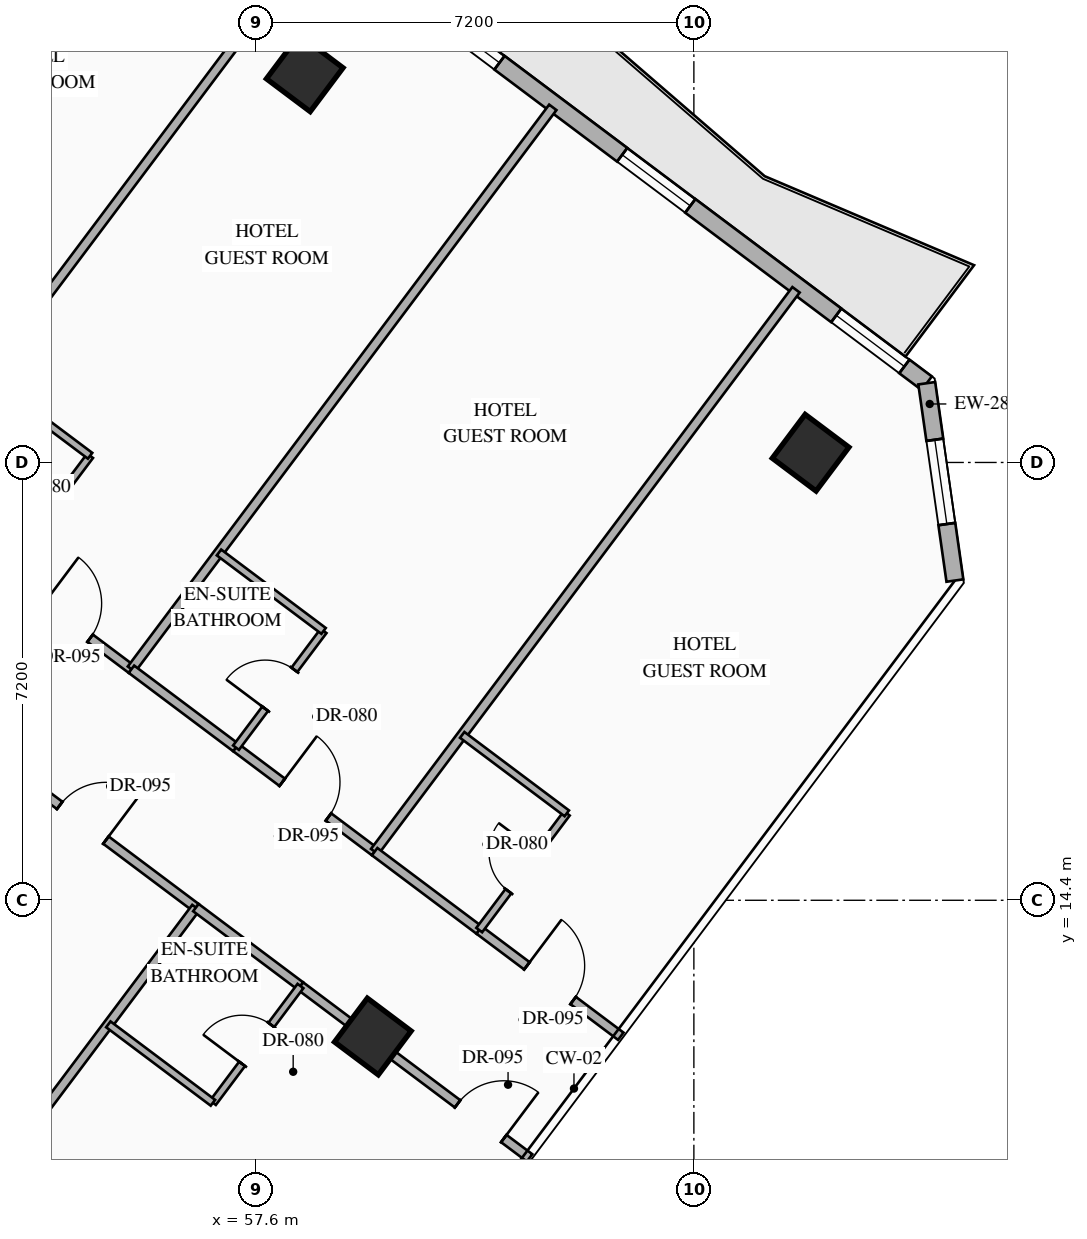
"""IFC4 building model, lengths in metres.
Left out: names, types, materials, properties, quantities, classifications, styles, units other than length and angle.
Written with IfcOpenShell. Run it as: python <this file> out.ifc"""

import sys

from ifc_helpers import new_model, si_unit, direction, frame, frame_2d, origin, origin_2d, place, context, subcontext, project, spatial, rectangle, hollow_rectangle, extrude, element, fill, save


model = new_model("IFC4")
c1 = context("Model", 3, precision=1e-05, world=origin(), true_north=direction((0.0, 1.0)))
c2 = subcontext(c1, "Body", "Model", "MODEL_VIEW")
j1 = project(units=[si_unit("LENGTHUNIT", "METRE"), si_unit("PLANEANGLEUNIT", "RADIAN")], contexts=[c1])
p1 = place(None, origin())
s1 = spatial("IfcSite", under=j1, at=p1, CompositionType="ELEMENT")
p2 = place(p1, origin())
s2 = spatial("IfcBuilding", under=s1, at=p2, CompositionType="ELEMENT")
p3 = place(p2, frame((0.0, 0.0, 88.0)))
s3 = spatial("IfcBuildingStorey", under=s2, at=p3, CompositionType="ELEMENT", Elevation=88.0)
for number, where, z_axis, x_axis in (
    (1, (58.4, 28.0, 0.0), (0.0, 0.0, 1.0), (0.8, -0.6, 0.0)),
    (2, (66.72, 21.76, 0.0), (0.0, 0.0, 1.0), (0.8, -0.6, 0.0)),
    (3, (59.52, 12.16, 0.0), (0.0, 0.0, 1.0), (0.8, -0.6, 0.0)),
):
    element("IfcColumn", number, at=place(p3, frame(where, z_axis=z_axis, x_axis=x_axis)), inside=s3, PredefinedType="COLUMN", context=c2, shape_type="SweptSolid", body=[
        extrude(hollow_rectangle(XDim=0.9, YDim=0.9, WallThickness=0.036, at=origin_2d()), origin(), (0.0, 0.0, 1.0), 3.35),
    ])
p4 = place(p3, frame((44.86, 40.73, 0.0), z_axis=(0.0, 0.0, 1.0), x_axis=(0.800006902154, -0.599990797017, 0.0)))
e4 = element("IfcWall", 4, at=p4, inside=s3, PredefinedType="STANDARD", context=c2, shape_type="SweptSolid", body=[
    extrude(rectangle(XDim=29.712, YDim=0.28, at=frame_2d((14.856, 0.0))), origin(), (0.0, 0.0, 1.0), 3.05),
])
p5 = place(p4, frame((14.249, 0.0, 0.0)))
e5 = element("IfcOpeningElement", 5, at=p5, cuts=e4, PredefinedType="OPENING", context=c2, shape_type="SweptSolid", body=[
    extrude(rectangle(XDim=1.1, YDim=2.2, at=frame_2d((0.55, 1.1))), frame((0.0, 0.15, 0.0), z_axis=(0.0, -1.0, 0.0), x_axis=(1.0, 0.0, 0.0)), (0.0, 0.0, 1.0), 0.3),
])
p6 = place(p4, frame((1.612, 0.0, 0.85)))
e6 = element("IfcOpeningElement", 6, at=p6, cuts=e4, PredefinedType="OPENING", context=c2, shape_type="SweptSolid", body=[
    extrude(rectangle(XDim=1.4, YDim=1.8, at=frame_2d((0.7, 0.9))), frame((0.0, 0.15, 0.0), z_axis=(0.0, -1.0, 0.0), x_axis=(1.0, 0.0, 0.0)), (0.0, 0.0, 1.0), 0.3),
])
p7 = place(p4, frame((5.667, 0.0, 0.85)))
e7 = element("IfcOpeningElement", 7, at=p7, cuts=e4, PredefinedType="OPENING", context=c2, shape_type="SweptSolid", body=[
    extrude(rectangle(XDim=1.4, YDim=1.8, at=frame_2d((0.7, 0.9))), frame((0.0, 0.15, 0.0), z_axis=(0.0, -1.0, 0.0), x_axis=(1.0, 0.0, 0.0)), (0.0, 0.0, 1.0), 0.3),
])
p8 = place(p4, frame((9.912, 0.0, 0.85)))
e8 = element("IfcOpeningElement", 8, at=p8, cuts=e4, PredefinedType="OPENING", context=c2, shape_type="SweptSolid", body=[
    extrude(rectangle(XDim=1.4, YDim=1.8, at=frame_2d((0.7, 0.9))), frame((0.0, 0.15, 0.0), z_axis=(0.0, -1.0, 0.0), x_axis=(1.0, 0.0, 0.0)), (0.0, 0.0, 1.0), 0.3),
])
p9 = place(p4, frame((19.528, 0.0, 0.85)))
e9 = element("IfcOpeningElement", 9, at=p9, cuts=e4, PredefinedType="OPENING", context=c2, shape_type="SweptSolid", body=[
    extrude(rectangle(XDim=1.4, YDim=1.8, at=frame_2d((0.7, 0.9))), frame((0.0, 0.15, 0.0), z_axis=(0.0, -1.0, 0.0), x_axis=(1.0, 0.0, 0.0)), (0.0, 0.0, 1.0), 0.3),
])
p10 = place(p4, frame((23.451, 0.0, 0.85)))
e10 = element("IfcOpeningElement", 10, at=p10, cuts=e4, PredefinedType="OPENING", context=c2, shape_type="SweptSolid", body=[
    extrude(rectangle(XDim=1.4, YDim=1.8, at=frame_2d((0.7, 0.9))), frame((0.0, 0.15, 0.0), z_axis=(0.0, -1.0, 0.0), x_axis=(1.0, 0.0, 0.0)), (0.0, 0.0, 1.0), 0.3),
])
p11 = place(p4, frame((27.852, 0.0, 0.85)))
e11 = element("IfcOpeningElement", 11, at=p11, cuts=e4, PredefinedType="OPENING", context=c2, shape_type="SweptSolid", body=[
    extrude(rectangle(XDim=1.4, YDim=1.8, at=frame_2d((0.7, 0.9))), frame((0.0, 0.15, 0.0), z_axis=(0.0, -1.0, 0.0), x_axis=(1.0, 0.0, 0.0)), (0.0, 0.0, 1.0), 0.3),
])
p12 = place(p3, frame((68.63, 22.903, 0.0), z_axis=(0.0, 0.0, 1.0), x_axis=(0.141285803956, -0.989968848803, 0.0)))
e12 = element("IfcWall", 12, at=p12, inside=s3, PredefinedType="STANDARD", context=c2, shape_type="SweptSolid", body=[
    extrude(rectangle(XDim=3.278, YDim=0.28, at=frame_2d((1.639, 0.0))), origin(), (0.0, 0.0, 1.0), 3.05),
])
p13 = place(p12, frame((0.939, 0.0, 0.85)))
e13 = element("IfcOpeningElement", 13, at=p13, cuts=e12, PredefinedType="OPENING", context=c2, shape_type="SweptSolid", body=[
    extrude(rectangle(XDim=1.4, YDim=1.8, at=frame_2d((0.7, 0.9))), frame((0.0, 0.15, 0.0), z_axis=(0.0, -1.0, 0.0), x_axis=(1.0, 0.0, 0.0)), (0.0, 0.0, 1.0), 0.3),
])
for number, where, z_axis, x_axis in (
    (14, (47.87, 23.96, 0.0), (0.0, 0.0, 1.0), (0.6, 0.8, 0.0)),
    (15, (51.71, 21.08, 0.0), (0.0, 0.0, 1.0), (0.6, 0.8, 0.0)),
):
    element("IfcWall", number, at=place(p3, frame(where, z_axis=z_axis, x_axis=x_axis)), inside=s3, PredefinedType="PARTITIONING", context=c2, shape_type="SweptSolid", body=[
        extrude(rectangle(XDim=11.55, YDim=0.15, at=frame_2d((5.775, 0.0))), origin(), (0.0, 0.0, 1.0), 3.05),
    ])
p14 = place(p3, frame((53.43, 19.79, 0.0), z_axis=(0.0, 0.0, 1.0), x_axis=(0.8, -0.6, 0.0)))
e16 = element("IfcWall", 16, at=p14, inside=s3, PredefinedType="PARTITIONING", context=c2, shape_type="SweptSolid", body=[
    extrude(rectangle(XDim=2.65, YDim=0.15, at=frame_2d((1.325, 0.0))), origin(), (0.0, 0.0, 1.0), 2.695),
])
p15 = place(p14, frame((0.85, 0.0, 0.0)))
e17 = element("IfcOpeningElement", 17, at=p15, cuts=e16, PredefinedType="OPENING", context=c2, shape_type="SweptSolid", body=[
    extrude(rectangle(XDim=0.95, YDim=2.15, at=frame_2d((0.475, 1.075))), frame((0.0, 0.085, 0.0), z_axis=(0.0, -1.0, 0.0), x_axis=(1.0, 0.0, 0.0)), (0.0, 0.0, 1.0), 0.17),
])
p16 = place(p3, frame((53.43, 19.79, 0.0), z_axis=(0.0, 0.0, 1.0), x_axis=(0.600065100855, 0.79995117022, 0.0)))
e18 = element("IfcWall", 18, at=p16, inside=s3, PredefinedType="PARTITIONING", context=c2, shape_type="SweptSolid", body=[
    extrude(rectangle(XDim=2.4, YDim=0.12, at=frame_2d((1.2, 0.0))), origin(), (0.0, 0.0, 1.0), 3.05),
])
p17 = place(p16, frame((0.8, 0.0, 0.0)))
e19 = element("IfcOpeningElement", 19, at=p17, cuts=e18, PredefinedType="OPENING", context=c2, shape_type="SweptSolid", body=[
    extrude(rectangle(XDim=0.8, YDim=2.06, at=frame_2d((0.4, 1.03))), frame((0.0, 0.07, 0.0), z_axis=(0.0, -1.0, 0.0), x_axis=(1.0, 0.0, 0.0)), (0.0, 0.0, 1.0), 0.14),
])
p18 = place(p3, frame((53.15, 23.0, 0.0), z_axis=(0.0, 0.0, 1.0), x_axis=(0.800027249606, -0.599963665473, 0.0)))
e20 = element("IfcWall", 20, at=p18, inside=s3, PredefinedType="PARTITIONING", context=c2, shape_type="SweptSolid", body=[
    extrude(rectangle(XDim=2.15, YDim=0.12, at=frame_2d((1.075, 0.0))), origin(), (0.0, 0.0, 1.0), 3.05),
])
p19 = place(p3, frame((55.55, 18.2, 0.0), z_axis=(0.0, 0.0, 1.0), x_axis=(0.599996617946, 0.80000253653, 0.0)))
e21 = element("IfcWall", 21, at=p19, inside=s3, PredefinedType="PARTITIONING", context=c2, shape_type="SweptSolid", body=[
    extrude(rectangle(XDim=11.55, YDim=0.15, at=frame_2d((5.775, 0.0))), origin(), (0.0, 0.0, 1.0), 3.05),
])
p20 = place(p3, frame((55.55, 18.2, 0.0), z_axis=(0.0, 0.0, 1.0), x_axis=(0.79998637334, -0.60001816845, 0.0)))
e22 = element("IfcWall", 22, at=p20, inside=s3, PredefinedType="PARTITIONING", context=c2, shape_type="SweptSolid", body=[
    extrude(rectangle(XDim=2.15, YDim=0.15, at=frame_2d((1.075, 0.0))), origin(), (0.0, 0.0, 1.0), 2.695),
])
p21 = place(p3, frame((57.27, 16.91, 0.0), z_axis=(0.0, 0.0, 1.0), x_axis=(0.800010279488, -0.599986293772, 0.0)))
e23 = element("IfcWall", 23, at=p21, inside=s3, PredefinedType="PARTITIONING", context=c2, shape_type="SweptSolid", body=[
    extrude(rectangle(XDim=2.85, YDim=0.15, at=frame_2d((1.425, 0.0))), origin(), (0.0, 0.0, 1.0), 2.695),
])
p22 = place(p21, frame((0.95, 0.0, 0.0)))
e24 = element("IfcOpeningElement", 24, at=p22, cuts=e23, PredefinedType="OPENING", context=c2, shape_type="SweptSolid", body=[
    extrude(rectangle(XDim=0.95, YDim=2.15, at=frame_2d((0.475, 1.075))), frame((0.0, 0.085, 0.0), z_axis=(0.0, -1.0, 0.0), x_axis=(1.0, 0.0, 0.0)), (0.0, 0.0, 1.0), 0.17),
])
p23 = place(p3, frame((57.27, 16.91, 0.0), z_axis=(0.0, 0.0, 1.0), x_axis=(0.599951172744, 0.800036618114, 0.0)))
e25 = element("IfcWall", 25, at=p23, inside=s3, PredefinedType="PARTITIONING", context=c2, shape_type="SweptSolid", body=[
    extrude(rectangle(XDim=2.4, YDim=0.12, at=frame_2d((1.2, 0.0))), origin(), (0.0, 0.0, 1.0), 3.05),
])
p24 = place(p23, frame((0.8, 0.0, 0.0)))
e26 = element("IfcOpeningElement", 26, at=p24, cuts=e25, PredefinedType="OPENING", context=c2, shape_type="SweptSolid", body=[
    extrude(rectangle(XDim=0.8, YDim=2.06, at=frame_2d((0.4, 1.03))), frame((0.0, 0.07, 0.0), z_axis=(0.0, -1.0, 0.0), x_axis=(1.0, 0.0, 0.0)), (0.0, 0.0, 1.0), 0.14),
])
p25 = place(p3, frame((56.99, 20.12, 0.0), z_axis=(0.0, 0.0, 1.0), x_axis=(0.79998637334, -0.60001816845, 0.0)))
e27 = element("IfcWall", 27, at=p25, inside=s3, PredefinedType="PARTITIONING", context=c2, shape_type="SweptSolid", body=[
    extrude(rectangle(XDim=2.15, YDim=0.12, at=frame_2d((1.075, 0.0))), origin(), (0.0, 0.0, 1.0), 3.05),
])
p26 = place(p3, frame((59.55, 15.2, 0.0), z_axis=(0.0, 0.0, 1.0), x_axis=(0.599996617946, 0.80000253653, 0.0)))
e28 = element("IfcWall", 28, at=p26, inside=s3, PredefinedType="PARTITIONING", context=c2, shape_type="SweptSolid", body=[
    extrude(rectangle(XDim=11.55, YDim=0.15, at=frame_2d((5.775, 0.0))), origin(), (0.0, 0.0, 1.0), 3.05),
])
p27 = place(p3, frame((59.55, 15.2, 0.0), z_axis=(0.0, 0.0, 1.0), x_axis=(0.79998637334, -0.60001816845, 0.0)))
e29 = element("IfcWall", 29, at=p27, inside=s3, PredefinedType="PARTITIONING", context=c2, shape_type="SweptSolid", body=[
    extrude(rectangle(XDim=2.15, YDim=0.15, at=frame_2d((1.075, 0.0))), origin(), (0.0, 0.0, 1.0), 2.695),
])
p28 = place(p3, frame((61.27, 13.91, 0.0), z_axis=(0.0, 0.0, 1.0), x_axis=(0.800010068184, -0.59998657552, 0.0)))
e30 = element("IfcWall", 30, at=p28, inside=s3, PredefinedType="PARTITIONING", context=c2, shape_type="SweptSolid", body=[
    extrude(rectangle(XDim=2.91, YDim=0.15, at=frame_2d((1.455, 0.0))), origin(), (0.0, 0.0, 1.0), 3.05),
])
p29 = place(p28, frame((0.98, 0.0, 0.0)))
e31 = element("IfcOpeningElement", 31, at=p29, cuts=e30, PredefinedType="OPENING", context=c2, shape_type="SweptSolid", body=[
    extrude(rectangle(XDim=0.95, YDim=2.15, at=frame_2d((0.475, 1.075))), frame((0.0, 0.085, 0.0), z_axis=(0.0, -1.0, 0.0), x_axis=(1.0, 0.0, 0.0)), (0.0, 0.0, 1.0), 0.17),
])
p30 = place(p3, frame((61.27, 13.91, 0.0), z_axis=(0.0, 0.0, 1.0), x_axis=(0.599951172744, 0.800036618114, 0.0)))
e32 = element("IfcWall", 32, at=p30, inside=s3, PredefinedType="PARTITIONING", context=c2, shape_type="SweptSolid", body=[
    extrude(rectangle(XDim=2.4, YDim=0.12, at=frame_2d((1.2, 0.0))), origin(), (0.0, 0.0, 1.0), 3.05),
])
p31 = place(p30, frame((0.8, 0.0, 0.0)))
e33 = element("IfcOpeningElement", 33, at=p31, cuts=e32, PredefinedType="OPENING", context=c2, shape_type="SweptSolid", body=[
    extrude(rectangle(XDim=0.8, YDim=2.06, at=frame_2d((0.4, 1.03))), frame((0.0, 0.07, 0.0), z_axis=(0.0, -1.0, 0.0), x_axis=(1.0, 0.0, 0.0)), (0.0, 0.0, 1.0), 0.14),
])
p32 = place(p3, frame((60.99, 17.12, 0.0), z_axis=(0.0, 0.0, 1.0), x_axis=(0.79998637334, -0.60001816845, 0.0)))
e34 = element("IfcWall", 34, at=p32, inside=s3, PredefinedType="PARTITIONING", context=c2, shape_type="SweptSolid", body=[
    extrude(rectangle(XDim=2.15, YDim=0.12, at=frame_2d((1.075, 0.0))), origin(), (0.0, 0.0, 1.0), 3.05),
])
p33 = place(p3, frame((52.89, 17.07, 0.0), z_axis=(0.0, 0.0, 1.0), x_axis=(0.800012600101, -0.599983199498, 0.0)))
e35 = element("IfcWall", 35, at=p33, inside=s3, PredefinedType="PARTITIONING", context=c2, shape_type="SweptSolid", body=[
    extrude(rectangle(XDim=4.65, YDim=0.15, at=frame_2d((2.325, 0.0))), origin(), (0.0, 0.0, 1.0), 2.345),
])
p34 = place(p33, frame((1.85, 0.0, 0.0)))
e36 = element("IfcOpeningElement", 36, at=p34, cuts=e35, PredefinedType="OPENING", context=c2, shape_type="SweptSolid", body=[
    extrude(rectangle(XDim=0.95, YDim=2.15, at=frame_2d((0.475, 1.075))), frame((0.0, 0.085, 0.0), z_axis=(0.0, -1.0, 0.0), x_axis=(1.0, 0.0, 0.0)), (0.0, 0.0, 1.0), 0.17),
])
p35 = place(p3, frame((49.8, 5.2, 0.0), z_axis=(0.0, 0.0, 1.0), x_axis=(0.6, 0.8, 0.0)))
e37 = element("IfcWall", 37, at=p35, inside=s3, PredefinedType="PARTITIONING", context=c2, shape_type="SweptSolid", body=[
    extrude(rectangle(XDim=11.35, YDim=0.15, at=frame_2d((5.675, 0.0))), origin(), (0.0, 0.0, 1.0), 3.05),
])
p36 = place(p3, frame((56.61, 14.28, 0.0), z_axis=(0.0, 0.0, 1.0), x_axis=(0.79998637334, -0.60001816845, 0.0)))
e38 = element("IfcWall", 38, at=p36, inside=s3, PredefinedType="PARTITIONING", context=c2, shape_type="SweptSolid", body=[
    extrude(rectangle(XDim=2.15, YDim=0.15, at=frame_2d((1.075, 0.0))), origin(), (0.0, 0.0, 1.0), 2.345),
])
p37 = place(p3, frame((58.33, 12.99, 0.0), z_axis=(0.0, 0.0, 1.0), x_axis=(0.799993779569, -0.600008293819, 0.0)))
e39 = element("IfcWall", 39, at=p37, inside=s3, PredefinedType="PARTITIONING", context=c2, shape_type="SweptSolid", body=[
    extrude(rectangle(XDim=4.71, YDim=0.15, at=frame_2d((2.355, 0.0))), origin(), (0.0, 0.0, 1.0), 2.345),
])
p38 = place(p37, frame((3.23, 0.0, 0.0)))
e40 = element("IfcOpeningElement", 40, at=p38, cuts=e39, PredefinedType="OPENING", context=c2, shape_type="SweptSolid", body=[
    extrude(rectangle(XDim=0.95, YDim=2.15, at=frame_2d((0.475, 1.075))), frame((0.0, 0.085, 0.0), z_axis=(0.0, -1.0, 0.0), x_axis=(1.0, 0.0, 0.0)), (0.0, 0.0, 1.0), 0.17),
])
p39 = place(p3, frame((56.89, 11.07, 0.0), z_axis=(0.0, 0.0, 1.0), x_axis=(0.600065100855, 0.79995117022, 0.0)))
e41 = element("IfcWall", 41, at=p39, inside=s3, PredefinedType="PARTITIONING", context=c2, shape_type="SweptSolid", body=[
    extrude(rectangle(XDim=2.4, YDim=0.12, at=frame_2d((1.2, 0.0))), origin(), (0.0, 0.0, 1.0), 3.05),
])
p40 = place(p39, frame((0.8, 0.0, 0.0)))
e42 = element("IfcOpeningElement", 42, at=p40, cuts=e41, PredefinedType="OPENING", context=c2, shape_type="SweptSolid", body=[
    extrude(rectangle(XDim=0.8, YDim=2.06, at=frame_2d((0.4, 1.03))), frame((0.0, 0.07, 0.0), z_axis=(0.0, -1.0, 0.0), x_axis=(1.0, 0.0, 0.0)), (0.0, 0.0, 1.0), 0.14),
])
p41 = place(p3, frame((55.17, 12.36, 0.0), z_axis=(0.0, 0.0, 1.0), x_axis=(0.79998637334, -0.60001816845, 0.0)))
e43 = element("IfcWall", 43, at=p41, inside=s3, PredefinedType="PARTITIONING", context=c2, shape_type="SweptSolid", body=[
    extrude(rectangle(XDim=2.15, YDim=0.12, at=frame_2d((1.075, 0.0))), origin(), (0.0, 0.0, 1.0), 3.05),
])
p42 = place(p9, origin())
e44 = element("IfcWindow", 44, at=p42, inside=s3, PartitioningType="SINGLE_PANEL", PredefinedType="WINDOW", context=c2, shape_type="SweptSolid", body=[
    extrude(rectangle(XDim=1.4, YDim=1.8, at=frame_2d((0.7, 0.9))), frame((0.0, 0.03, 0.0), z_axis=(0.0, -1.0, 0.0), x_axis=(1.0, 0.0, 0.0)), (0.0, 0.0, 1.0), 0.06),
])
fill(e9, e44)
p43 = place(p10, origin())
e45 = element("IfcWindow", 45, at=p43, inside=s3, PartitioningType="SINGLE_PANEL", PredefinedType="WINDOW", context=c2, shape_type="SweptSolid", body=[
    extrude(rectangle(XDim=1.4, YDim=1.8, at=frame_2d((0.7, 0.9))), frame((0.0, 0.03, 0.0), z_axis=(0.0, -1.0, 0.0), x_axis=(1.0, 0.0, 0.0)), (0.0, 0.0, 1.0), 0.06),
])
fill(e10, e45)
p44 = place(p11, origin())
e46 = element("IfcWindow", 46, at=p44, inside=s3, PartitioningType="SINGLE_PANEL", PredefinedType="WINDOW", context=c2, shape_type="SweptSolid", body=[
    extrude(rectangle(XDim=1.4, YDim=1.8, at=frame_2d((0.7, 0.9))), frame((0.0, 0.03, 0.0), z_axis=(0.0, -1.0, 0.0), x_axis=(1.0, 0.0, 0.0)), (0.0, 0.0, 1.0), 0.06),
])
fill(e11, e46)
p45 = place(p13, origin())
e47 = element("IfcWindow", 47, at=p45, inside=s3, PartitioningType="SINGLE_PANEL", PredefinedType="WINDOW", context=c2, shape_type="SweptSolid", body=[
    extrude(rectangle(XDim=1.4, YDim=1.8, at=frame_2d((0.7, 0.9))), frame((0.0, 0.03, 0.0), z_axis=(0.0, -1.0, 0.0), x_axis=(1.0, 0.0, 0.0)), (0.0, 0.0, 1.0), 0.06),
])
fill(e13, e47)
p46 = place(p15, origin())
e48 = element("IfcDoor", 48, at=p46, inside=s3, OperationType="SINGLE_SWING_LEFT", PredefinedType="DOOR", context=c2, shape_type="SweptSolid", body=[
    extrude(rectangle(XDim=0.95, YDim=2.15, at=frame_2d((0.475, 1.075))), frame((0.0, 0.025, 0.0), z_axis=(0.0, -1.0, 0.0), x_axis=(1.0, 0.0, 0.0)), (0.0, 0.0, 1.0), 0.05),
])
fill(e17, e48)
p47 = place(p17, origin())
e49 = element("IfcDoor", 49, at=p47, inside=s3, OperationType="SINGLE_SWING_RIGHT", PredefinedType="DOOR", context=c2, shape_type="SweptSolid", body=[
    extrude(rectangle(XDim=0.8, YDim=2.06, at=frame_2d((0.4, 1.03))), frame((0.0, 0.025, 0.0), z_axis=(0.0, -1.0, 0.0), x_axis=(1.0, 0.0, 0.0)), (0.0, 0.0, 1.0), 0.05),
])
fill(e19, e49)
p48 = place(p22, origin())
e50 = element("IfcDoor", 50, at=p48, inside=s3, OperationType="SINGLE_SWING_LEFT", PredefinedType="DOOR", context=c2, shape_type="SweptSolid", body=[
    extrude(rectangle(XDim=0.95, YDim=2.15, at=frame_2d((0.475, 1.075))), frame((0.0, 0.025, 0.0), z_axis=(0.0, -1.0, 0.0), x_axis=(1.0, 0.0, 0.0)), (0.0, 0.0, 1.0), 0.05),
])
fill(e24, e50)
p49 = place(p24, origin())
e51 = element("IfcDoor", 51, at=p49, inside=s3, OperationType="SINGLE_SWING_LEFT", PredefinedType="DOOR", context=c2, shape_type="SweptSolid", body=[
    extrude(rectangle(XDim=0.8, YDim=2.06, at=frame_2d((0.4, 1.03))), frame((0.0, 0.025, 0.0), z_axis=(0.0, -1.0, 0.0), x_axis=(1.0, 0.0, 0.0)), (0.0, 0.0, 1.0), 0.05),
])
fill(e26, e51)
p50 = place(p29, origin())
e52 = element("IfcDoor", 52, at=p50, inside=s3, OperationType="SINGLE_SWING_LEFT", PredefinedType="DOOR", context=c2, shape_type="SweptSolid", body=[
    extrude(rectangle(XDim=0.95, YDim=2.15, at=frame_2d((0.475, 1.075))), frame((0.0, 0.025, 0.0), z_axis=(0.0, -1.0, 0.0), x_axis=(1.0, 0.0, 0.0)), (0.0, 0.0, 1.0), 0.05),
])
fill(e31, e52)
p51 = place(p31, origin())
e53 = element("IfcDoor", 53, at=p51, inside=s3, OperationType="SINGLE_SWING_RIGHT", PredefinedType="DOOR", context=c2, shape_type="SweptSolid", body=[
    extrude(rectangle(XDim=0.8, YDim=2.06, at=frame_2d((0.4, 1.03))), frame((0.0, 0.025, 0.0), z_axis=(0.0, -1.0, 0.0), x_axis=(1.0, 0.0, 0.0)), (0.0, 0.0, 1.0), 0.05),
])
fill(e33, e53)
p52 = place(p34, origin())
e54 = element("IfcDoor", 54, at=p52, inside=s3, OperationType="SINGLE_SWING_RIGHT", PredefinedType="DOOR", context=c2, shape_type="SweptSolid", body=[
    extrude(rectangle(XDim=0.95, YDim=2.15, at=frame_2d((0.475, 1.075))), frame((0.0, 0.025, 0.0), z_axis=(0.0, -1.0, 0.0), x_axis=(1.0, 0.0, 0.0)), (0.0, 0.0, 1.0), 0.05),
])
fill(e36, e54)
p53 = place(p38, origin())
e55 = element("IfcDoor", 55, at=p53, inside=s3, OperationType="SINGLE_SWING_RIGHT", PredefinedType="DOOR", context=c2, shape_type="SweptSolid", body=[
    extrude(rectangle(XDim=0.95, YDim=2.15, at=frame_2d((0.475, 1.075))), frame((0.0, 0.025, 0.0), z_axis=(0.0, -1.0, 0.0), x_axis=(1.0, 0.0, 0.0)), (0.0, 0.0, 1.0), 0.05),
])
fill(e40, e55)
p54 = place(p40, origin())
e56 = element("IfcDoor", 56, at=p54, inside=s3, OperationType="SINGLE_SWING_LEFT", PredefinedType="DOOR", context=c2, shape_type="SweptSolid", body=[
    extrude(rectangle(XDim=0.8, YDim=2.06, at=frame_2d((0.4, 1.03))), frame((0.0, 0.025, 0.0), z_axis=(0.0, -1.0, 0.0), x_axis=(1.0, 0.0, 0.0)), (0.0, 0.0, 1.0), 0.05),
])
fill(e42, e56)
save(model, sys.argv[1])
